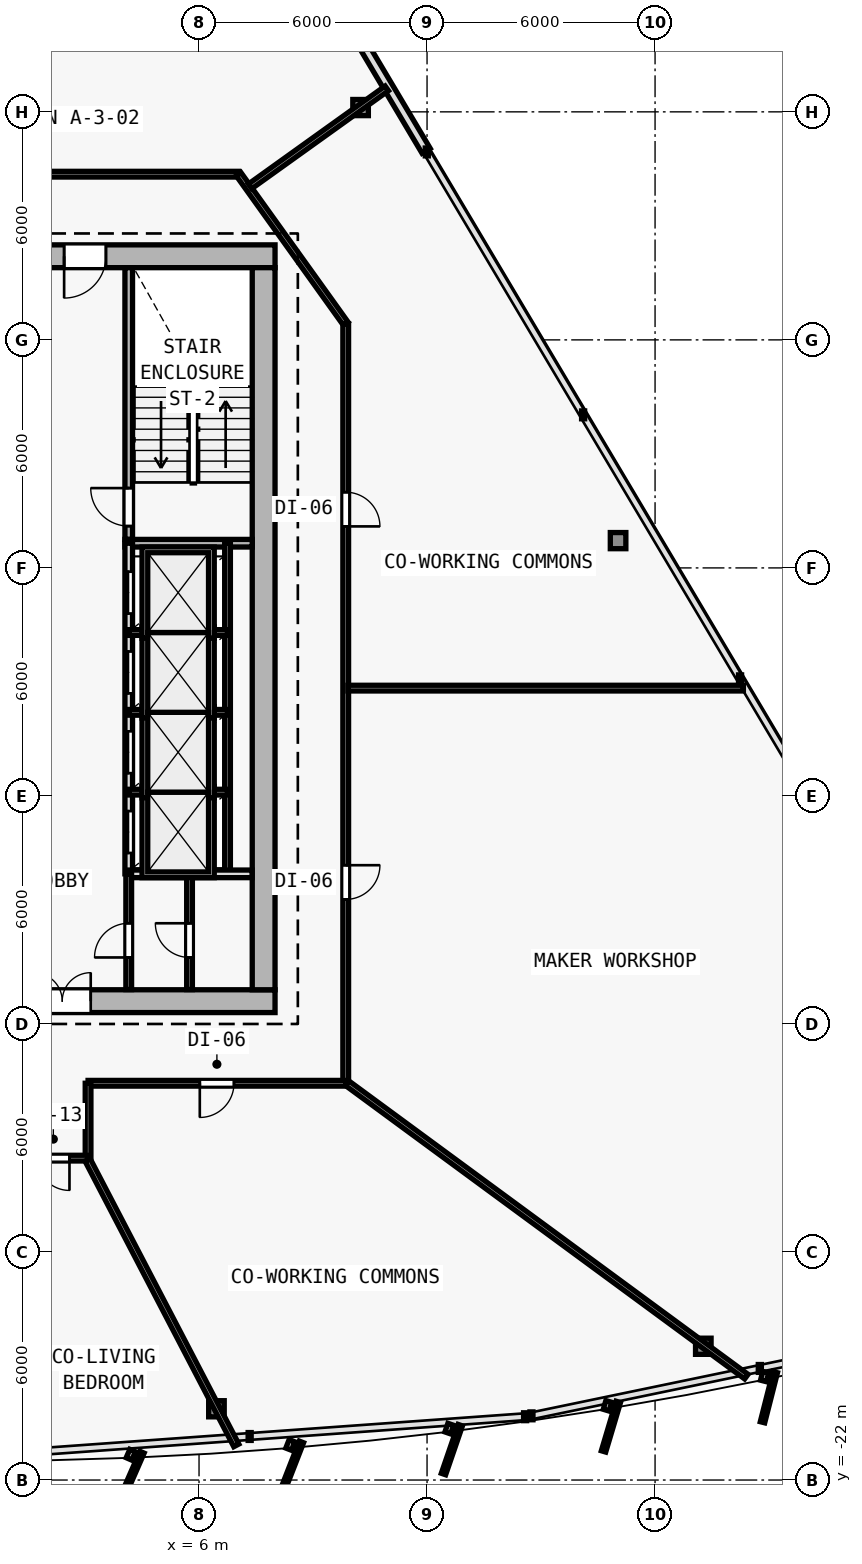
"""IFC4 building model, lengths in metres.
Left out: names, types, materials, properties, quantities, classifications, styles, units other than length and angle.
Written with IfcOpenShell. Run it as: python <this file> out.ifc"""

import sys

from ifc_helpers import new_model, si_unit, direction, frame, frame_2d, origin, origin_2d, place, context, subcontext, project, spatial, rectangle, i_section, extrude, element, fill, save


model = new_model("IFC4")
c1 = context("Model", 3, precision=1e-05, world=origin(), true_north=direction((0.0, 1.0)))
c2 = subcontext(c1, "Body", "Model", "MODEL_VIEW")
j1 = project(units=[si_unit("LENGTHUNIT", "METRE"), si_unit("PLANEANGLEUNIT", "RADIAN")], contexts=[c1])
p1 = place(None, origin())
s1 = spatial("IfcSite", under=j1, at=p1, CompositionType="ELEMENT")
p2 = place(p1, origin())
s2 = spatial("IfcBuilding", under=s1, at=p2, CompositionType="ELEMENT")
p3 = place(p2, frame((0.0, 0.0, 82.5)))
s3 = spatial("IfcBuildingStorey", under=s2, at=p3, CompositionType="ELEMENT", Elevation=82.5)
for number, where, z_axis, x_axis in (
    (1, (7.7, -9.4, 0.0), (0.0, 0.0, 1.0), (1.0, 0.0, 0.0)),
    (2, (7.7, 10.2, 0.0), (0.0, 0.0, 1.0), (1.0, 0.0, 0.0)),
    (3, (7.7, 0.4, 0.0), (0.0, 0.0, 1.0), (1.0, 0.0, 0.0)),
):
    element("IfcColumn", number, at=place(p3, frame(where, z_axis=z_axis, x_axis=x_axis)), inside=s3, PredefinedType="COLUMN", context=c2, shape_type="SweptSolid", body=[
        extrude(i_section(OverallWidth=0.409, OverallDepth=0.425, WebThickness=0.021, FlangeThickness=0.034, FilletRadius=0.015, at=origin_2d()), origin(), (0.0, 0.0, 1.0), 3.6),
    ])
p4 = place(p3, frame((6.458, -20.125, 0.006), z_axis=(-0.006934288159, 0.035283289748, 0.999353293441), x_axis=(-0.981229659911, -0.192842823335, 0.0)))
e4 = element("IfcColumn", 4, at=p4, inside=s3, PredefinedType="COLUMN", context=c2, shape_type="SweptSolid", body=[
    extrude(i_section(OverallWidth=0.409, OverallDepth=0.425, WebThickness=0.021, FlangeThickness=0.034, FilletRadius=0.015, at=origin_2d()), origin(), (0.0, 0.0, 1.0), 3.591),
])
p5 = place(p3, frame((19.269, -18.48, 0.006), z_axis=(-0.020596292833, 0.033511459955, 0.999226087917), x_axis=(-0.851954850327, -0.523615252838, 0.0)))
e5 = element("IfcColumn", 5, at=p5, inside=s3, PredefinedType="COLUMN", context=c2, shape_type="SweptSolid", body=[
    extrude(i_section(OverallWidth=0.409, OverallDepth=0.425, WebThickness=0.021, FlangeThickness=0.034, FilletRadius=0.015, at=origin_2d()), origin(), (0.0, 0.0, 1.0), 3.592),
])
p6 = place(p3, frame((17.027, 2.718, 0.006), z_axis=(-0.018907326549, 0.00952167524, 0.999775900241), x_axis=(-0.449781931574, -0.893138406984, 0.0)))
e6 = element("IfcColumn", 6, at=p6, inside=s3, PredefinedType="COLUMN", context=c2, shape_type="SweptSolid", body=[
    extrude(i_section(OverallWidth=0.409, OverallDepth=0.425, WebThickness=0.021, FlangeThickness=0.034, FilletRadius=0.015, at=origin_2d()), origin(), (0.0, 0.0, 1.0), 3.59),
])
p7 = place(p3, frame((10.251, 14.113, 0.006), z_axis=(-0.011767855299, -0.002516824544, 0.999927588966), x_axis=(0.209143047003, -0.977885057607, 0.0)))
e7 = element("IfcColumn", 7, at=p7, inside=s3, PredefinedType="COLUMN", context=c2, shape_type="SweptSolid", body=[
    extrude(i_section(OverallWidth=0.409, OverallDepth=0.425, WebThickness=0.021, FlangeThickness=0.034, FilletRadius=0.015, at=origin_2d()), origin(), (0.0, 0.0, 1.0), 3.589),
])
p8 = place(p3, frame((6.172, 22.734, 0.0), z_axis=(0.0, 0.0, 1.0), x_axis=(0.511105869751, -0.859517765905, 0.0)))
e8 = element("IfcWall", 8, at=p8, inside=s3, PredefinedType="SOLIDWALL", context=c2, shape_type="SweptSolid", body=[
    extrude(rectangle(XDim=11.357, YDim=0.25, at=frame_2d((5.678, 0.0))), origin(), (0.0, 0.0, 1.0), 3.35),
])
p9 = place(p8, frame((5.128, 0.0, 0.62)))
e9 = element("IfcOpeningElement", 9, at=p9, cuts=e8, PredefinedType="OPENING", context=c2, shape_type="SweptSolid", body=[
    extrude(rectangle(XDim=1.1, YDim=1.8, at=frame_2d((0.55, 0.9))), frame((0.0, 0.135, 0.0), z_axis=(0.0, -1.0, 0.0), x_axis=(1.0, 0.0, 0.0)), (0.0, 0.0, 1.0), 0.27),
])
p10 = place(p3, frame((-8.0, -9.4, 0.0), z_axis=(0.0, 0.0, 1.0), x_axis=(1.0, 0.0, 0.0)))
e10 = element("IfcWall", 10, at=p10, inside=s3, PredefinedType="SHEAR", context=c2, shape_type="SweptSolid", body=[
    extrude(rectangle(XDim=16.0, YDim=0.6, at=frame_2d((8.0, 0.0))), origin(), (0.0, 0.0, 1.0), 3.35),
])
p11 = place(p10, frame((9.65, 0.0, 0.0)))
e11 = element("IfcOpeningElement", 11, at=p11, cuts=e10, PredefinedType="OPENING", context=c2, shape_type="SweptSolid", body=[
    extrude(rectangle(XDim=1.5, YDim=2.2, at=frame_2d((0.75, 1.1))), frame((0.0, 0.31, 0.0), z_axis=(0.0, -1.0, 0.0), x_axis=(1.0, 0.0, 0.0)), (0.0, 0.0, 1.0), 0.62),
])
p12 = place(p3, frame((8.0, 10.2, 0.0), z_axis=(0.0, 0.0, 1.0), x_axis=(-1.0, 0.0, 0.0)))
e12 = element("IfcWall", 12, at=p12, inside=s3, PredefinedType="SHEAR", context=c2, shape_type="SweptSolid", body=[
    extrude(rectangle(XDim=16.0, YDim=0.6, at=frame_2d((8.0, 0.0))), origin(), (0.0, 0.0, 1.0), 3.35),
])
p13 = place(p12, frame((4.45, 0.0, 0.0)))
e13 = element("IfcOpeningElement", 13, at=p13, cuts=e12, PredefinedType="OPENING", context=c2, shape_type="SweptSolid", body=[
    extrude(rectangle(XDim=1.1, YDim=2.15, at=frame_2d((0.55, 1.075))), frame((0.0, 0.31, 0.0), z_axis=(0.0, -1.0, 0.0), x_axis=(1.0, 0.0, 0.0)), (0.0, 0.0, 1.0), 0.62),
])
p14 = place(p3, frame((7.7, 9.9, 0.0), z_axis=(0.0, 0.0, 1.0), x_axis=(0.0, -1.0, 0.0)))
e14 = element("IfcWall", 14, at=p14, inside=s3, PredefinedType="SHEAR", context=c2, shape_type="SweptSolid", body=[
    extrude(rectangle(XDim=19.0, YDim=0.6, at=frame_2d((9.5, 0.0))), origin(), (0.0, 0.0, 1.0), 3.35),
])
p15 = place(p3, frame((4.15, 2.75, 0.0), z_axis=(0.0, 0.0, 1.0), x_axis=(0.0, 1.0, 0.0)))
e15 = element("IfcWall", 15, at=p15, inside=s3, PredefinedType="SOLIDWALL", context=c2, shape_type="SweptSolid", body=[
    extrude(rectangle(XDim=7.15, YDim=0.2, at=frame_2d((3.575, 0.0))), origin(), (0.0, 0.0, 1.0), 3.35),
])
p16 = place(p15, frame((0.35, 0.0, 0.0)))
e16 = element("IfcOpeningElement", 16, at=p16, cuts=e15, PredefinedType="OPENING", context=c2, shape_type="SweptSolid", body=[
    extrude(rectangle(XDim=1.0, YDim=2.15, at=frame_2d((0.5, 1.075))), frame((0.0, 0.11, 0.0), z_axis=(0.0, -1.0, 0.0), x_axis=(1.0, 0.0, 0.0)), (0.0, 0.0, 1.0), 0.22),
])
p17 = place(p3, frame((4.05, 2.65, 0.0), z_axis=(0.0, 0.0, 1.0), x_axis=(1.0, 0.0, 0.0)))
e17 = element("IfcWall", 17, at=p17, inside=s3, PredefinedType="SOLIDWALL", context=c2, shape_type="SweptSolid", body=[
    extrude(rectangle(XDim=3.35, YDim=0.2, at=frame_2d((1.675, 0.0))), origin(), (0.0, 0.0, 1.0), 3.35),
])
p18 = place(p3, frame((4.15, -6.05, 0.0), z_axis=(0.0, 0.0, 1.0), x_axis=(0.0, 1.0, 0.0)))
e18 = element("IfcWall", 18, at=p18, inside=s3, PredefinedType="SOLIDWALL", context=c2, shape_type="SweptSolid", body=[
    extrude(rectangle(XDim=8.7, YDim=0.2, at=frame_2d((4.35, 0.0))), origin(), (0.0, 0.0, 1.0), 3.35),
])
p19 = place(p18, frame((0.55, 0.0, 0.0)))
e19 = element("IfcOpeningElement", 19, at=p19, cuts=e18, PredefinedType="OPENING", context=c2, shape_type="SweptSolid", body=[
    extrude(rectangle(XDim=1.1, YDim=2.15, at=frame_2d((0.55, 1.075))), frame((0.0, 0.11, 0.0), z_axis=(0.0, -1.0, 0.0), x_axis=(1.0, 0.0, 0.0)), (0.0, 0.0, 1.0), 0.22),
])
p20 = place(p18, frame((2.65, 0.0, 0.0)))
e20 = element("IfcOpeningElement", 20, at=p20, cuts=e18, PredefinedType="OPENING", context=c2, shape_type="SweptSolid", body=[
    extrude(rectangle(XDim=1.1, YDim=2.15, at=frame_2d((0.55, 1.075))), frame((0.0, 0.11, 0.0), z_axis=(0.0, -1.0, 0.0), x_axis=(1.0, 0.0, 0.0)), (0.0, 0.0, 1.0), 0.22),
])
p21 = place(p18, frame((4.75, 0.0, 0.0)))
e21 = element("IfcOpeningElement", 21, at=p21, cuts=e18, PredefinedType="OPENING", context=c2, shape_type="SweptSolid", body=[
    extrude(rectangle(XDim=1.1, YDim=2.15, at=frame_2d((0.55, 1.075))), frame((0.0, 0.11, 0.0), z_axis=(0.0, -1.0, 0.0), x_axis=(1.0, 0.0, 0.0)), (0.0, 0.0, 1.0), 0.22),
])
p22 = place(p18, frame((6.85, 0.0, 0.0)))
e22 = element("IfcOpeningElement", 22, at=p22, cuts=e18, PredefinedType="OPENING", context=c2, shape_type="SweptSolid", body=[
    extrude(rectangle(XDim=1.1, YDim=2.15, at=frame_2d((0.55, 1.075))), frame((0.0, 0.11, 0.0), z_axis=(0.0, -1.0, 0.0), x_axis=(1.0, 0.0, 0.0)), (0.0, 0.0, 1.0), 0.22),
])
p23 = place(p3, frame((6.75, -6.05, 0.0), z_axis=(0.0, 0.0, 1.0), x_axis=(0.0, 1.0, 0.0)))
e23 = element("IfcWall", 23, at=p23, inside=s3, PredefinedType="PARTITIONING", context=c2, shape_type="SweptSolid", body=[
    extrude(rectangle(XDim=8.7, YDim=0.15, at=frame_2d((4.35, 0.0))), origin(), (0.0, 0.0, 1.0), 3.35),
])
for number, where, z_axis, x_axis in (
    (24, (4.15, -3.9, 0.0), (0.0, 0.0, 1.0), (1.0, 0.0, 0.0)),
    (25, (4.15, -1.8, 0.0), (0.0, 0.0, 1.0), (1.0, 0.0, 0.0)),
    (26, (4.15, 0.3, 0.0), (0.0, 0.0, 1.0), (1.0, 0.0, 0.0)),
):
    element("IfcWall", number, at=place(p3, frame(where, z_axis=z_axis, x_axis=x_axis)), inside=s3, PredefinedType="PARTITIONING", context=c2, shape_type="SweptSolid", body=[
        extrude(rectangle(XDim=2.6, YDim=0.15, at=frame_2d((1.3, 0.0))), origin(), (0.0, 0.0, 1.0), 3.35),
    ])
p24 = place(p3, frame((4.15, -6.05, 0.0), z_axis=(0.0, 0.0, 1.0), x_axis=(1.0, 0.0, 0.0)))
e27 = element("IfcWall", 27, at=p24, inside=s3, PredefinedType="SOLIDWALL", context=c2, shape_type="SweptSolid", body=[
    extrude(rectangle(XDim=3.245, YDim=0.2, at=frame_2d((1.623, 0.0))), origin(), (0.0, 0.0, 1.0), 3.35),
])
p25 = place(p3, frame((4.15, -9.095, 0.0), z_axis=(0.0, 0.0, 1.0), x_axis=(0.0, 1.0, 0.0)))
e28 = element("IfcWall", 28, at=p25, inside=s3, PredefinedType="PARTITIONING", context=c2, shape_type="SweptSolid", body=[
    extrude(rectangle(XDim=3.045, YDim=0.15, at=frame_2d((1.522, 0.0))), origin(), (0.0, 0.0, 1.0), 3.35),
])
p26 = place(p25, frame((0.845, 0.0, 0.0)))
e29 = element("IfcOpeningElement", 29, at=p26, cuts=e28, PredefinedType="OPENING", context=c2, shape_type="SweptSolid", body=[
    extrude(rectangle(XDim=0.9, YDim=2.1, at=frame_2d((0.45, 1.05))), frame((0.0, 0.085, 0.0), z_axis=(0.0, -1.0, 0.0), x_axis=(1.0, 0.0, 0.0)), (0.0, 0.0, 1.0), 0.17),
])
p27 = place(p3, frame((5.75, -9.095, 0.0), z_axis=(0.0, 0.0, 1.0), x_axis=(0.0, 1.0, 0.0)))
e30 = element("IfcWall", 30, at=p27, inside=s3, PredefinedType="PARTITIONING", context=c2, shape_type="SweptSolid", body=[
    extrude(rectangle(XDim=3.045, YDim=0.15, at=frame_2d((1.522, 0.0))), origin(), (0.0, 0.0, 1.0), 3.35),
])
p28 = place(p27, frame((0.845, 0.0, 0.0)))
e31 = element("IfcOpeningElement", 31, at=p28, cuts=e30, PredefinedType="OPENING", context=c2, shape_type="SweptSolid", body=[
    extrude(rectangle(XDim=0.9, YDim=2.1, at=frame_2d((0.45, 1.05))), frame((0.0, 0.085, 0.0), z_axis=(0.0, -1.0, 0.0), x_axis=(1.0, 0.0, 0.0)), (0.0, 0.0, 1.0), 0.17),
])
p29 = place(p3, frame((-7.041, 12.36, 0.0), z_axis=(0.0, 0.0, 1.0), x_axis=(1.0, 0.0, 0.0)))
e32 = element("IfcWall", 32, at=p29, inside=s3, PredefinedType="PARTITIONING", context=c2, shape_type="SweptSolid", body=[
    extrude(rectangle(XDim=14.082, YDim=0.15, at=frame_2d((7.041, 0.0))), origin(), (0.0, 0.0, 1.0), 3.35),
])
p30 = place(p29, frame((6.591, 0.0, 0.0)))
e33 = element("IfcOpeningElement", 33, at=p30, cuts=e32, PredefinedType="OPENING", context=c2, shape_type="SweptSolid", body=[
    extrude(rectangle(XDim=0.9, YDim=2.1, at=frame_2d((0.45, 1.05))), frame((0.0, 0.085, 0.0), z_axis=(0.0, -1.0, 0.0), x_axis=(1.0, 0.0, 0.0)), (0.0, 0.0, 1.0), 0.17),
])
p31 = place(p3, frame((7.041, 12.36, 0.0), z_axis=(0.0, 0.0, 1.0), x_axis=(0.582449511476, -0.812866881218, 0.0)))
e34 = element("IfcWall", 34, at=p31, inside=s3, PredefinedType="PARTITIONING", context=c2, shape_type="SweptSolid", body=[
    extrude(rectangle(XDim=4.84, YDim=0.15, at=frame_2d((2.42, 0.0))), origin(), (0.0, 0.0, 1.0), 2.775),
])
p32 = place(p3, frame((9.86, 8.426, 0.0), z_axis=(0.0, 0.0, 1.0), x_axis=(0.0, -1.0, 0.0)))
e35 = element("IfcWall", 35, at=p32, inside=s3, PredefinedType="PARTITIONING", context=c2, shape_type="SweptSolid", body=[
    extrude(rectangle(XDim=19.986, YDim=0.15, at=frame_2d((9.993, 0.0))), origin(), (0.0, 0.0, 1.0), 2.609),
])
p33 = place(p32, frame((14.248, 0.0, 0.0)))
e36 = element("IfcOpeningElement", 36, at=p33, cuts=e35, PredefinedType="OPENING", context=c2, shape_type="SweptSolid", body=[
    extrude(rectangle(XDim=0.9, YDim=2.1, at=frame_2d((0.45, 1.05))), frame((0.0, 0.085, 0.0), z_axis=(0.0, -1.0, 0.0), x_axis=(1.0, 0.0, 0.0)), (0.0, 0.0, 1.0), 0.17),
])
p34 = place(p32, frame((4.434, 0.0, 0.0)))
e37 = element("IfcOpeningElement", 37, at=p34, cuts=e35, PredefinedType="OPENING", context=c2, shape_type="SweptSolid", body=[
    extrude(rectangle(XDim=0.9, YDim=2.1, at=frame_2d((0.45, 1.05))), frame((0.0, 0.085, 0.0), z_axis=(0.0, -1.0, 0.0), x_axis=(1.0, 0.0, 0.0)), (0.0, 0.0, 1.0), 0.17),
])
p35 = place(p3, frame((9.86, -11.56, 0.0), z_axis=(0.0, 0.0, 1.0), x_axis=(-1.0, 0.0, 0.0)))
e38 = element("IfcWall", 38, at=p35, inside=s3, PredefinedType="PARTITIONING", context=c2, shape_type="SweptSolid", body=[
    extrude(rectangle(XDim=6.78, YDim=0.15, at=frame_2d((3.39, 0.0))), origin(), (0.0, 0.0, 1.0), 3.055),
])
p36 = place(p35, frame((2.94, 0.0, 0.0)))
e39 = element("IfcOpeningElement", 39, at=p36, cuts=e38, PredefinedType="OPENING", context=c2, shape_type="SweptSolid", body=[
    extrude(rectangle(XDim=0.9, YDim=2.1, at=frame_2d((0.45, 1.05))), frame((0.0, 0.085, 0.0), z_axis=(0.0, -1.0, 0.0), x_axis=(1.0, 0.0, 0.0)), (0.0, 0.0, 1.0), 0.17),
])
p37 = place(p3, frame((3.08, -11.56, 0.0), z_axis=(0.0, 0.0, 1.0), x_axis=(0.0, -1.0, 0.0)))
e40 = element("IfcWall", 40, at=p37, inside=s3, PredefinedType="PARTITIONING", context=c2, shape_type="SweptSolid", body=[
    extrude(rectangle(XDim=1.97, YDim=0.15, at=frame_2d((0.985, 0.0))), origin(), (0.0, 0.0, 1.0), 3.055),
])
p38 = place(p3, frame((3.08, -13.53, 0.0), z_axis=(0.0, 0.0, 1.0), x_axis=(-1.0, 0.0, 0.0)))
e41 = element("IfcWall", 41, at=p38, inside=s3, PredefinedType="PARTITIONING", context=c2, shape_type="SweptSolid", body=[
    extrude(rectangle(XDim=6.16, YDim=0.15, at=frame_2d((3.08, 0.0))), origin(), (0.0, 0.0, 1.0), 2.725),
])
p39 = place(p38, frame((4.487, 0.0, 0.0)))
e42 = element("IfcOpeningElement", 42, at=p39, cuts=e41, PredefinedType="OPENING", context=c2, shape_type="SweptSolid", body=[
    extrude(rectangle(XDim=0.9, YDim=2.1, at=frame_2d((0.45, 1.05))), frame((0.0, 0.085, 0.0), z_axis=(0.0, -1.0, 0.0), x_axis=(1.0, 0.0, 0.0)), (0.0, 0.0, 1.0), 0.17),
])
p40 = place(p38, frame((2.386, 0.0, 0.0)))
e43 = element("IfcOpeningElement", 43, at=p40, cuts=e41, PredefinedType="OPENING", context=c2, shape_type="SweptSolid", body=[
    extrude(rectangle(XDim=0.9, YDim=2.1, at=frame_2d((0.45, 1.05))), frame((0.0, 0.085, 0.0), z_axis=(0.0, -1.0, 0.0), x_axis=(1.0, 0.0, 0.0)), (0.0, 0.0, 1.0), 0.17),
])
p41 = place(p38, frame((0.489, 0.0, 0.0)))
e44 = element("IfcOpeningElement", 44, at=p41, cuts=e41, PredefinedType="OPENING", context=c2, shape_type="SweptSolid", body=[
    extrude(rectangle(XDim=0.85, YDim=2.1, at=frame_2d((0.425, 1.05))), frame((0.0, 0.085, 0.0), z_axis=(0.0, -1.0, 0.0), x_axis=(1.0, 0.0, 0.0)), (0.0, 0.0, 1.0), 0.17),
])
p42 = place(p3, frame((3.066, -13.573, 0.0), z_axis=(0.0, 0.0, 1.0), x_axis=(0.461995798776, -0.886882112749, 0.0)))
e45 = element("IfcWall", 45, at=p42, inside=s3, PredefinedType="PARTITIONING", context=c2, shape_type="SweptSolid", body=[
    extrude(rectangle(XDim=8.474, YDim=0.15, at=frame_2d((4.237, 0.0))), origin(), (0.0, 0.0, 1.0), 2.725),
])
p43 = place(p3, frame((9.896, -11.558, 0.0), z_axis=(0.0, 0.0, 1.0), x_axis=(0.805759814493, -0.592242451492, 0.0)))
e46 = element("IfcWall", 46, at=p43, inside=s3, PredefinedType="PARTITIONING", context=c2, shape_type="SweptSolid", body=[
    extrude(rectangle(XDim=13.038, YDim=0.15, at=frame_2d((6.519, 0.0))), origin(), (0.0, 0.0, 1.0), 2.725),
])
p44 = place(p3, frame((7.344, 12.04, 0.0), z_axis=(0.0, 0.0, 1.0), x_axis=(0.812867633401, 0.582448461728, 0.0)))
e47 = element("IfcWall", 47, at=p44, inside=s3, PredefinedType="PARTITIONING", context=c2, shape_type="SweptSolid", body=[
    extrude(rectangle(XDim=4.425, YDim=0.15, at=frame_2d((2.212, 0.0))), origin(), (0.0, 0.0, 1.0), 2.835),
])
p45 = place(p3, frame((9.92, -1.163, 0.0), z_axis=(0.0, 0.0, 1.0), x_axis=(1.0, 0.0, 0.0)))
e48 = element("IfcWall", 48, at=p45, inside=s3, PredefinedType="PARTITIONING", context=c2, shape_type="SweptSolid", body=[
    extrude(rectangle(XDim=10.404, YDim=0.15, at=frame_2d((5.202, 0.0))), origin(), (0.0, 0.0, 1.0), 2.725),
])
p46 = place(p11, origin())
e49 = element("IfcDoor", 49, at=p46, inside=s3, OperationType="DOUBLE_DOOR_SINGLE_SWING", PredefinedType="DOOR", context=c2, shape_type="SweptSolid", body=[
    extrude(rectangle(XDim=1.5, YDim=2.2, at=frame_2d((0.75, 1.1))), frame((0.0, 0.025, 0.0), z_axis=(0.0, -1.0, 0.0), x_axis=(1.0, 0.0, 0.0)), (0.0, 0.0, 1.0), 0.05),
])
fill(e11, e49)
p47 = place(p13, origin())
e50 = element("IfcDoor", 50, at=p47, inside=s3, OperationType="SINGLE_SWING_RIGHT", PredefinedType="DOOR", context=c2, shape_type="SweptSolid", body=[
    extrude(rectangle(XDim=1.1, YDim=2.15, at=frame_2d((0.55, 1.075))), frame((0.0, 0.025, 0.0), z_axis=(0.0, -1.0, 0.0), x_axis=(1.0, 0.0, 0.0)), (0.0, 0.0, 1.0), 0.05),
])
fill(e13, e50)
p48 = place(p16, origin())
e51 = element("IfcDoor", 51, at=p48, inside=s3, OperationType="SINGLE_SWING_RIGHT", PredefinedType="DOOR", context=c2, shape_type="SweptSolid", body=[
    extrude(rectangle(XDim=1.0, YDim=2.15, at=frame_2d((0.5, 1.075))), frame((0.0, 0.025, 0.0), z_axis=(0.0, -1.0, 0.0), x_axis=(1.0, 0.0, 0.0)), (0.0, 0.0, 1.0), 0.05),
])
fill(e16, e51)
p49 = place(p19, origin())
e52 = element("IfcDoor", 52, at=p49, inside=s3, OperationType="DOUBLE_DOOR_SLIDING", PredefinedType="DOOR", context=c2, shape_type="SweptSolid", body=[
    extrude(rectangle(XDim=1.1, YDim=2.15, at=frame_2d((0.55, 1.075))), frame((0.0, 0.025, 0.0), z_axis=(0.0, -1.0, 0.0), x_axis=(1.0, 0.0, 0.0)), (0.0, 0.0, 1.0), 0.05),
])
fill(e19, e52)
p50 = place(p20, origin())
e53 = element("IfcDoor", 53, at=p50, inside=s3, OperationType="DOUBLE_DOOR_SLIDING", PredefinedType="DOOR", context=c2, shape_type="SweptSolid", body=[
    extrude(rectangle(XDim=1.1, YDim=2.15, at=frame_2d((0.55, 1.075))), frame((0.0, 0.025, 0.0), z_axis=(0.0, -1.0, 0.0), x_axis=(1.0, 0.0, 0.0)), (0.0, 0.0, 1.0), 0.05),
])
fill(e20, e53)
p51 = place(p21, origin())
e54 = element("IfcDoor", 54, at=p51, inside=s3, OperationType="DOUBLE_DOOR_SLIDING", PredefinedType="DOOR", context=c2, shape_type="SweptSolid", body=[
    extrude(rectangle(XDim=1.1, YDim=2.15, at=frame_2d((0.55, 1.075))), frame((0.0, 0.025, 0.0), z_axis=(0.0, -1.0, 0.0), x_axis=(1.0, 0.0, 0.0)), (0.0, 0.0, 1.0), 0.05),
])
fill(e21, e54)
p52 = place(p22, origin())
e55 = element("IfcDoor", 55, at=p52, inside=s3, OperationType="DOUBLE_DOOR_SLIDING", PredefinedType="DOOR", context=c2, shape_type="SweptSolid", body=[
    extrude(rectangle(XDim=1.1, YDim=2.15, at=frame_2d((0.55, 1.075))), frame((0.0, 0.025, 0.0), z_axis=(0.0, -1.0, 0.0), x_axis=(1.0, 0.0, 0.0)), (0.0, 0.0, 1.0), 0.05),
])
fill(e22, e55)
p53 = place(p26, origin())
e56 = element("IfcDoor", 56, at=p53, inside=s3, OperationType="SINGLE_SWING_LEFT", PredefinedType="DOOR", context=c2, shape_type="SweptSolid", body=[
    extrude(rectangle(XDim=0.9, YDim=2.1, at=frame_2d((0.45, 1.05))), frame((0.0, 0.025, 0.0), z_axis=(0.0, -1.0, 0.0), x_axis=(1.0, 0.0, 0.0)), (0.0, 0.0, 1.0), 0.05),
])
fill(e29, e56)
p54 = place(p28, origin())
e57 = element("IfcDoor", 57, at=p54, inside=s3, OperationType="SINGLE_SWING_RIGHT", PredefinedType="DOOR", context=c2, shape_type="SweptSolid", body=[
    extrude(rectangle(XDim=0.9, YDim=2.1, at=frame_2d((0.45, 1.05))), frame((0.0, 0.025, 0.0), z_axis=(0.0, -1.0, 0.0), x_axis=(1.0, 0.0, 0.0)), (0.0, 0.0, 1.0), 0.05),
])
fill(e31, e57)
p55 = place(p41, origin())
e58 = element("IfcDoor", 58, at=p55, inside=s3, OperationType="SINGLE_SWING_LEFT", PredefinedType="DOOR", context=c2, shape_type="SweptSolid", body=[
    extrude(rectangle(XDim=0.85, YDim=2.1, at=frame_2d((0.425, 1.05))), frame((0.0, 0.025, 0.0), z_axis=(0.0, -1.0, 0.0), x_axis=(1.0, 0.0, 0.0)), (0.0, 0.0, 1.0), 0.05),
])
fill(e44, e58)
p56 = place(p36, origin())
e59 = element("IfcDoor", 59, at=p56, inside=s3, OperationType="SINGLE_SWING_RIGHT", PredefinedType="DOOR", context=c2, shape_type="SweptSolid", body=[
    extrude(rectangle(XDim=0.9, YDim=2.1, at=frame_2d((0.45, 1.05))), frame((0.0, 0.025, 0.0), z_axis=(0.0, -1.0, 0.0), x_axis=(1.0, 0.0, 0.0)), (0.0, 0.0, 1.0), 0.05),
])
fill(e39, e59)
p57 = place(p33, origin())
e60 = element("IfcDoor", 60, at=p57, inside=s3, OperationType="SINGLE_SWING_LEFT", PredefinedType="DOOR", context=c2, shape_type="SweptSolid", body=[
    extrude(rectangle(XDim=0.9, YDim=2.1, at=frame_2d((0.45, 1.05))), frame((0.0, 0.025, 0.0), z_axis=(0.0, -1.0, 0.0), x_axis=(1.0, 0.0, 0.0)), (0.0, 0.0, 1.0), 0.05),
])
fill(e36, e60)
p58 = place(p34, origin())
e61 = element("IfcDoor", 61, at=p58, inside=s3, OperationType="SINGLE_SWING_RIGHT", PredefinedType="DOOR", context=c2, shape_type="SweptSolid", body=[
    extrude(rectangle(XDim=0.9, YDim=2.1, at=frame_2d((0.45, 1.05))), frame((0.0, 0.025, 0.0), z_axis=(0.0, -1.0, 0.0), x_axis=(1.0, 0.0, 0.0)), (0.0, 0.0, 1.0), 0.05),
])
fill(e37, e61)
save(model, sys.argv[1])
